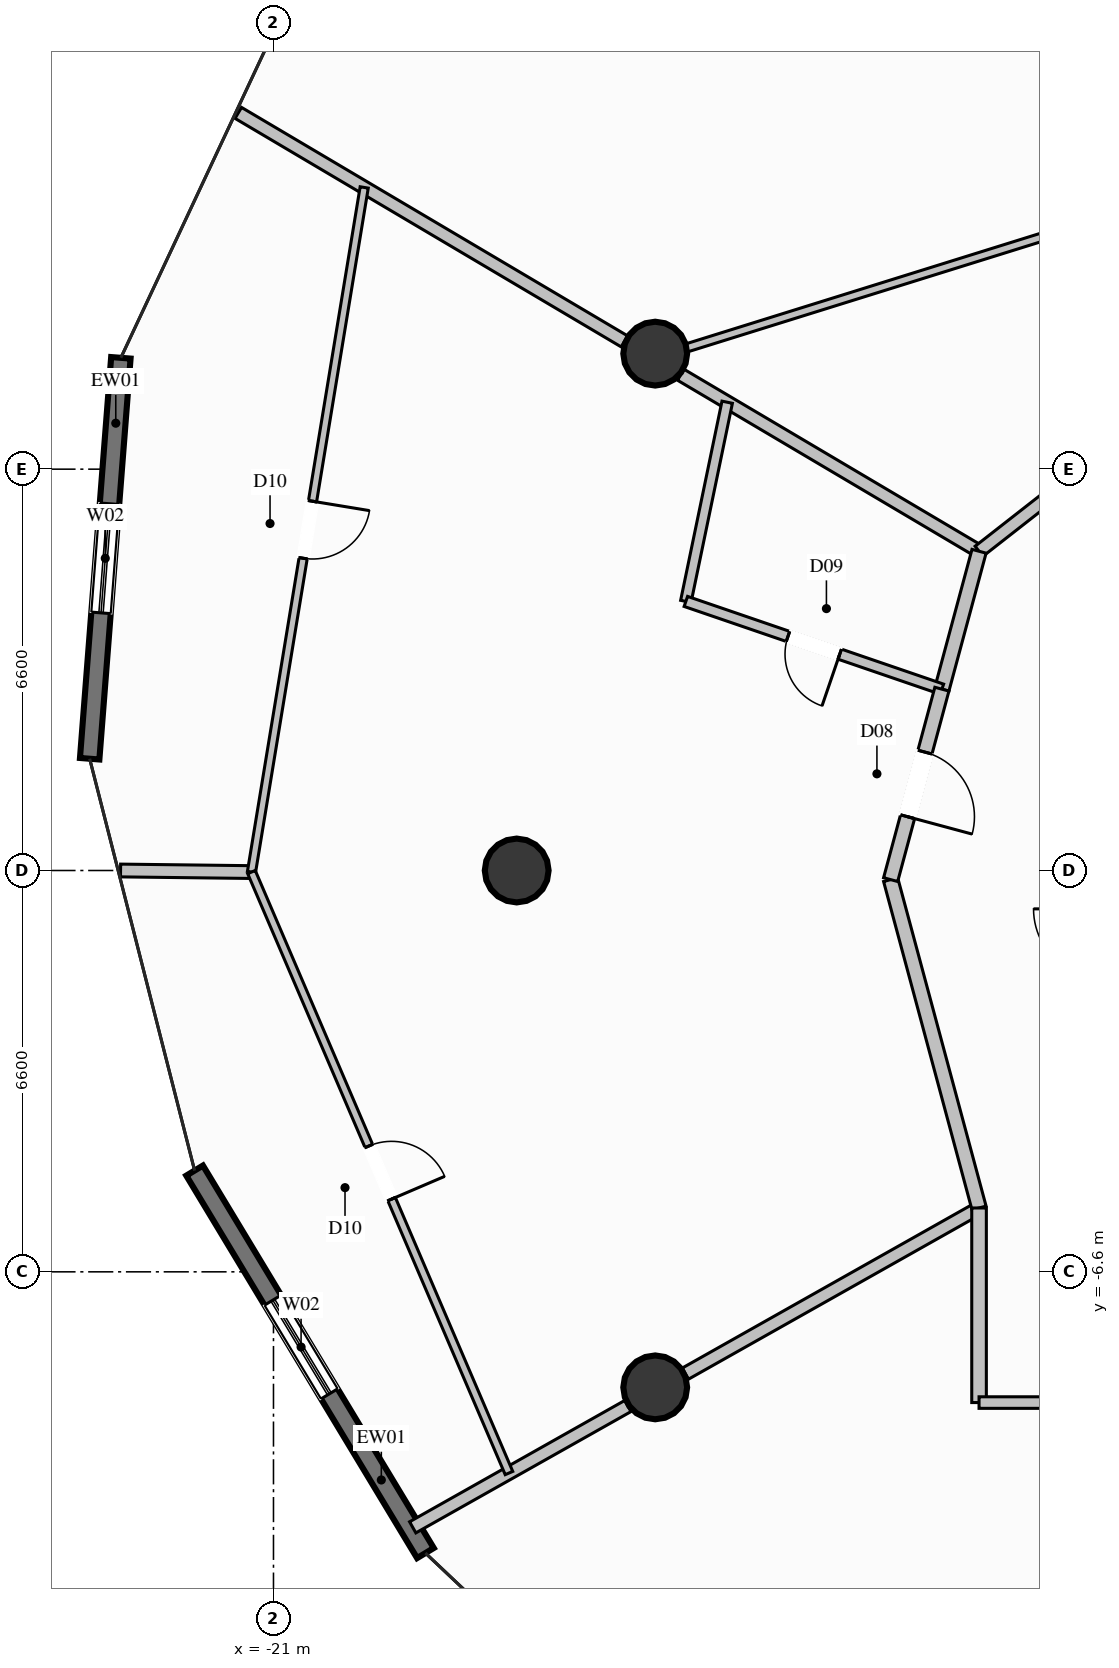
"""IFC4 building model, lengths in metres.
Left out: names, types, materials, properties, quantities, classifications, styles, units other than length and angle.
Written with IfcOpenShell. Run it as: python <this file> out.ifc"""

import sys

from ifc_helpers import new_model, si_unit, direction, frame, frame_2d, origin, origin_2d, place, context, subcontext, project, spatial, rectangle, circle, extrude, element, fill, save


model = new_model("IFC4")
c1 = context("Model", 3, precision=1e-05, world=origin(), true_north=direction((0.0, 1.0)))
c2 = subcontext(c1, "Body", "Model", "MODEL_VIEW")
j1 = project(units=[si_unit("LENGTHUNIT", "METRE"), si_unit("PLANEANGLEUNIT", "RADIAN")], contexts=[c1])
p1 = place(None, origin())
s1 = spatial("IfcSite", under=j1, at=p1, CompositionType="ELEMENT")
p2 = place(p1, origin())
s2 = spatial("IfcBuilding", under=s1, at=p2, CompositionType="ELEMENT")
p3 = place(p2, frame((0.0, 0.0, 120.6)))
s3 = spatial("IfcBuildingStorey", under=s2, at=p3, CompositionType="ELEMENT", Elevation=120.6)
for number, where, z_axis, x_axis in (
    (1, (-14.722, 8.5, 0.0), (0.0, 0.0, 1.0), (1.0, 0.0, 0.0)),
    (2, (-17.0, 0.0, 0.0), (0.0, 0.0, 1.0), (1.0, 0.0, 0.0)),
    (3, (-14.722, -8.5, 0.0), (0.0, 0.0, 1.0), (1.0, 0.0, 0.0)),
):
    element("IfcColumn", number, at=place(p3, frame(where, z_axis=z_axis, x_axis=x_axis)), inside=s3, PredefinedType="COLUMN", context=c2, shape_type="SweptSolid", body=[
        extrude(circle(Radius=0.525, at=origin_2d()), origin(), (0.0, 0.0, 1.0), 3.6),
    ])
p4 = place(p3, frame((-24.023, 1.838, 0.0), z_axis=(0.0, 0.0, 1.0), x_axis=(0.077566011703, 0.996987218488, 0.0)))
e4 = element("IfcWall", 4, at=p4, inside=s3, PredefinedType="SOLIDWALL", context=c2, shape_type="SweptSolid", body=[
    extrude(rectangle(XDim=6.613, YDim=0.32, at=frame_2d((3.307, 0.0))), origin(), (0.0, 0.0, 1.0), 3.35),
])
p5 = place(p4, frame((2.406, 0.0, 0.35)))
e5 = element("IfcOpeningElement", 5, at=p5, cuts=e4, PredefinedType="OPENING", context=c2, shape_type="SweptSolid", body=[
    extrude(rectangle(XDim=1.8, YDim=2.6, at=frame_2d((0.9, 1.3))), frame((0.0, 0.17, 0.0), z_axis=(0.0, -1.0, 0.0), x_axis=(1.0, 0.0, 0.0)), (0.0, 0.0, 1.0), 0.34),
])
p6 = place(p3, frame((-18.501, -11.225, 0.0), z_axis=(0.0, 0.0, 1.0), x_axis=(-0.516707807554, 0.856161808079, 0.0)))
e6 = element("IfcWall", 6, at=p6, inside=s3, PredefinedType="SOLIDWALL", context=c2, shape_type="SweptSolid", body=[
    extrude(rectangle(XDim=7.347, YDim=0.32, at=frame_2d((3.673, 0.0))), origin(), (0.0, 0.0, 1.0), 3.35),
])
p7 = place(p6, frame((3.058, 0.0, 0.35)))
e7 = element("IfcOpeningElement", 7, at=p7, cuts=e6, PredefinedType="OPENING", context=c2, shape_type="SweptSolid", body=[
    extrude(rectangle(XDim=1.8, YDim=2.6, at=frame_2d((0.9, 1.3))), frame((0.0, 0.17, 0.0), z_axis=(0.0, -1.0, 0.0), x_axis=(1.0, 0.0, 0.0)), (0.0, 0.0, 1.0), 0.34),
])
p8 = place(p3, frame((-9.396, 5.25, 0.0), z_axis=(0.0, 0.0, 1.0), x_axis=(-0.860613457584, 0.509258752134, 0.0)))
e8 = element("IfcWall", 8, at=p8, inside=s3, PredefinedType="PARTITIONING", context=c2, shape_type="SweptSolid", body=[
    extrude(rectangle(XDim=5.701, YDim=0.21, at=frame_2d((2.85, 0.0))), origin(), (0.0, 0.0, 1.0), 2.719),
])
p9 = place(p3, frame((-15.228, 8.701, 0.0), z_axis=(0.0, 0.0, 1.0), x_axis=(-0.860620773238, 0.509246388962, 0.0)))
e9 = element("IfcWall", 9, at=p9, inside=s3, PredefinedType="PARTITIONING", context=c2, shape_type="SweptSolid", body=[
    extrude(rectangle(XDim=7.38, YDim=0.21, at=frame_2d((3.69, 0.0))), origin(), (0.0, 0.0, 1.0), 3.35),
])
p10 = place(p3, frame((-9.396, -5.55, 0.0), z_axis=(0.0, 0.0, 1.0), x_axis=(-0.871038847926, -0.491214133962, 0.0)))
e10 = element("IfcWall", 10, at=p10, inside=s3, PredefinedType="PARTITIONING", context=c2, shape_type="SweptSolid", body=[
    extrude(rectangle(XDim=5.545, YDim=0.21, at=frame_2d((2.772, 0.0))), origin(), (0.0, 0.0, 1.0), 2.719),
])
p11 = place(p3, frame((-15.172, -8.807, 0.0), z_axis=(0.0, 0.0, 1.0), x_axis=(-0.871040458587, -0.491211277867, 0.0)))
e11 = element("IfcWall", 11, at=p11, inside=s3, PredefinedType="PARTITIONING", context=c2, shape_type="SweptSolid", body=[
    extrude(rectangle(XDim=4.062, YDim=0.21, at=frame_2d((2.031, 0.0))), origin(), (0.0, 0.0, 1.0), 3.35),
])
p12 = place(p3, frame((-9.396, 5.25, 0.0), z_axis=(0.0, 0.0, 1.0), x_axis=(0.7876993483, 0.6160598483, 0.0)))
e12 = element("IfcWall", 12, at=p12, inside=s3, PredefinedType="PARTITIONING", context=c2, shape_type="SweptSolid", body=[
    extrude(rectangle(XDim=2.597, YDim=0.21, at=frame_2d((1.299, 0.0))), origin(), (0.0, 0.0, 1.0), 3.35),
])
p13 = place(p3, frame((-14.757, 8.422, 0.0), z_axis=(0.0, 0.0, 1.0), x_axis=(0.954677897028, 0.297640912722, 0.0)))
e13 = element("IfcWall", 13, at=p13, inside=s3, PredefinedType="PARTITIONING", context=c2, shape_type="SweptSolid", body=[
    extrude(rectangle(XDim=15.458, YDim=0.135, at=frame_2d((7.729, 0.0))), origin(), (0.0, 0.0, 1.0), 2.878),
])
p14 = place(p13, frame((7.254, 0.0, 0.0)))
e14 = element("IfcOpeningElement", 14, at=p14, cuts=e13, PredefinedType="OPENING", context=c2, shape_type="SweptSolid", body=[
    extrude(rectangle(XDim=0.95, YDim=2.1, at=frame_2d((0.475, 1.05))), frame((0.0, 0.078, 0.0), z_axis=(0.0, -1.0, 0.0), x_axis=(1.0, 0.0, 0.0)), (0.0, 0.0, 1.0), 0.155),
])
p15 = place(p3, frame((-9.396, 5.25, 0.0), z_axis=(0.0, 0.0, 1.0), x_axis=(-0.260152382661, -0.965567572879, 0.0)))
e15 = element("IfcWall", 15, at=p15, inside=s3, PredefinedType="PARTITIONING", context=c2, shape_type="SweptSolid", body=[
    extrude(rectangle(XDim=2.349, YDim=0.24, at=frame_2d((1.174, 0.0))), origin(), (0.0, 0.0, 1.0), 3.35),
])
p16 = place(p3, frame((-13.538, 7.701, 0.0), z_axis=(0.0, 0.0, 1.0), x_axis=(-0.203225696563, -0.979131919741, 0.0)))
e16 = element("IfcWall", 16, at=p16, inside=s3, PredefinedType="PLUMBINGWALL", context=c2, shape_type="SweptSolid", body=[
    extrude(rectangle(XDim=3.346, YDim=0.175, at=frame_2d((1.673, 0.0))), origin(), (0.0, 0.0, 1.0), 3.35),
])
p17 = place(p3, frame((-10.007, 2.982, 0.0), z_axis=(0.0, 0.0, 1.0), x_axis=(-0.945989686211, 0.3241967205, 0.0)))
e17 = element("IfcWall", 17, at=p17, inside=s3, PredefinedType="PLUMBINGWALL", context=c2, shape_type="SweptSolid", body=[
    extrude(rectangle(XDim=4.451, YDim=0.175, at=frame_2d((2.226, 0.0))), origin(), (0.0, 0.0, 1.0), 3.35),
])
p18 = place(p17, frame((1.776, 0.0, 0.0)))
e18 = element("IfcOpeningElement", 18, at=p18, cuts=e17, PredefinedType="OPENING", context=c2, shape_type="SweptSolid", body=[
    extrude(rectangle(XDim=0.9, YDim=2.1, at=frame_2d((0.45, 1.05))), frame((0.0, 0.098, 0.0), z_axis=(0.0, -1.0, 0.0), x_axis=(1.0, 0.0, 0.0)), (0.0, 0.0, 1.0), 0.195),
])
p19 = place(p3, frame((-21.362, -0.026, 0.0), z_axis=(0.0, 0.0, 1.0), x_axis=(-0.999927757215, 0.012019997989, 0.0)))
e19 = element("IfcWall", 19, at=p19, inside=s3, PredefinedType="PARTITIONING", context=c2, shape_type="SweptSolid", body=[
    extrude(rectangle(XDim=2.153, YDim=0.21, at=frame_2d((1.077, 0.0))), origin(), (0.0, 0.0, 1.0), 3.35),
])
p20 = place(p3, frame((-10.85, -0.15, 0.0), z_axis=(0.0, 0.0, 1.0), x_axis=(0.260009481157, -0.965606063417, 0.0)))
e20 = element("IfcWall", 20, at=p20, inside=s3, PredefinedType="PARTITIONING", context=c2, shape_type="SweptSolid", body=[
    extrude(rectangle(XDim=5.593, YDim=0.24, at=frame_2d((2.796, 0.0))), origin(), (0.0, 0.0, 1.0), 3.35),
])
p21 = place(p3, frame((-10.007, 2.982, 0.0), z_axis=(0.0, 0.0, 1.0), x_axis=(-0.259924881751, -0.965628839589, 0.0)))
e21 = element("IfcWall", 21, at=p21, inside=s3, PredefinedType="PARTITIONING", context=c2, shape_type="SweptSolid", body=[
    extrude(rectangle(XDim=3.243, YDim=0.24, at=frame_2d((1.622, 0.0))), origin(), (0.0, 0.0, 1.0), 3.35),
])
p22 = place(p21, frame((1.072, 0.0, 0.0)))
e22 = element("IfcOpeningElement", 22, at=p22, cuts=e21, PredefinedType="OPENING", context=c2, shape_type="SweptSolid", body=[
    extrude(rectangle(XDim=1.1, YDim=2.3, at=frame_2d((0.55, 1.15))), frame((0.0, 0.13, 0.0), z_axis=(0.0, -1.0, 0.0), x_axis=(1.0, 0.0, 0.0)), (0.0, 0.0, 1.0), 0.26),
])
p23 = place(p3, frame((-19.508, 11.233, 0.0), z_axis=(0.0, 0.0, 1.0), x_axis=(-0.16248342038, -0.986711273931, 0.0)))
e23 = element("IfcWall", 23, at=p23, inside=s3, PredefinedType="PARTITIONING", context=c2, shape_type="SweptSolid", body=[
    extrude(rectangle(XDim=11.41, YDim=0.135, at=frame_2d((5.705, 0.0))), origin(), (0.0, 0.0, 1.0), 3.35),
])
p24 = place(p23, frame((5.23, 0.0, 0.0)))
e24 = element("IfcOpeningElement", 24, at=p24, cuts=e23, PredefinedType="OPENING", context=c2, shape_type="SweptSolid", body=[
    extrude(rectangle(XDim=0.95, YDim=2.1, at=frame_2d((0.475, 1.05))), frame((0.0, 0.078, 0.0), z_axis=(0.0, -1.0, 0.0), x_axis=(1.0, 0.0, 0.0)), (0.0, 0.0, 1.0), 0.155),
])
p25 = place(p3, frame((-21.362, -0.026, 0.0), z_axis=(0.0, 0.0, 1.0), x_axis=(0.39388093293, -0.919161471491, 0.0)))
e25 = element("IfcWall", 25, at=p25, inside=s3, PredefinedType="PARTITIONING", context=c2, shape_type="SweptSolid", body=[
    extrude(rectangle(XDim=10.752, YDim=0.135, at=frame_2d((5.376, 0.0))), origin(), (0.0, 0.0, 1.0), 3.35),
])
p26 = place(p25, frame((4.901, 0.0, 0.0)))
e26 = element("IfcOpeningElement", 26, at=p26, cuts=e25, PredefinedType="OPENING", context=c2, shape_type="SweptSolid", body=[
    extrude(rectangle(XDim=0.95, YDim=2.1, at=frame_2d((0.475, 1.05))), frame((0.0, 0.078, 0.0), z_axis=(0.0, -1.0, 0.0), x_axis=(1.0, 0.0, 0.0)), (0.0, 0.0, 1.0), 0.155),
])
p27 = place(p3, frame((-9.396, -5.55, 0.0), z_axis=(0.0, 0.0, 1.0), x_axis=(0.0, -1.0, 0.0)))
e27 = element("IfcWall", 27, at=p27, inside=s3, PredefinedType="PARTITIONING", context=c2, shape_type="SweptSolid", body=[
    extrude(rectangle(XDim=3.2, YDim=0.24, at=frame_2d((1.6, 0.0))), origin(), (0.0, 0.0, 1.0), 3.35),
])
p28 = place(p3, frame((-9.396, -8.75, 0.0), z_axis=(0.0, 0.0, 1.0), x_axis=(1.0, 0.0, 0.0)))
e28 = element("IfcWall", 28, at=p28, inside=s3, PredefinedType="PARTITIONING", context=c2, shape_type="SweptSolid", body=[
    extrude(rectangle(XDim=4.228, YDim=0.19, at=frame_2d((2.114, 0.0))), origin(), (0.0, 0.0, 1.0), 3.35),
])
p29 = place(p28, frame((1.639, 0.0, 0.0)))
e29 = element("IfcOpeningElement", 29, at=p29, cuts=e28, PredefinedType="OPENING", context=c2, shape_type="SweptSolid", body=[
    extrude(rectangle(XDim=0.95, YDim=2.1, at=frame_2d((0.475, 1.05))), frame((0.0, 0.105, 0.0), z_axis=(0.0, -1.0, 0.0), x_axis=(1.0, 0.0, 0.0)), (0.0, 0.0, 1.0), 0.21),
])
p30 = place(p5, origin())
e30 = element("IfcWindow", 30, at=p30, inside=s3, PartitioningType="SINGLE_PANEL", PredefinedType="WINDOW", context=c2, shape_type="SweptSolid", body=[
    extrude(rectangle(XDim=1.8, YDim=2.6, at=frame_2d((0.9, 1.3))), frame((0.0, 0.03, 0.0), z_axis=(0.0, -1.0, 0.0), x_axis=(1.0, 0.0, 0.0)), (0.0, 0.0, 1.0), 0.06),
])
fill(e5, e30)
p31 = place(p7, origin())
e31 = element("IfcWindow", 31, at=p31, inside=s3, PartitioningType="SINGLE_PANEL", PredefinedType="WINDOW", context=c2, shape_type="SweptSolid", body=[
    extrude(rectangle(XDim=1.8, YDim=2.6, at=frame_2d((0.9, 1.3))), frame((0.0, 0.03, 0.0), z_axis=(0.0, -1.0, 0.0), x_axis=(1.0, 0.0, 0.0)), (0.0, 0.0, 1.0), 0.06),
])
fill(e7, e31)
p32 = place(p18, origin())
e32 = element("IfcDoor", 32, at=p32, inside=s3, OperationType="SINGLE_SWING_LEFT", PredefinedType="DOOR", context=c2, shape_type="SweptSolid", body=[
    extrude(rectangle(XDim=0.9, YDim=2.1, at=frame_2d((0.45, 1.05))), frame((0.0, 0.025, 0.0), z_axis=(0.0, -1.0, 0.0), x_axis=(1.0, 0.0, 0.0)), (0.0, 0.0, 1.0), 0.05),
])
fill(e18, e32)
p33 = place(p22, origin())
e33 = element("IfcDoor", 33, at=p33, inside=s3, OperationType="SINGLE_SWING_RIGHT", PredefinedType="DOOR", context=c2, shape_type="SweptSolid", body=[
    extrude(rectangle(XDim=1.1, YDim=2.3, at=frame_2d((0.55, 1.15))), frame((0.0, 0.025, 0.0), z_axis=(0.0, -1.0, 0.0), x_axis=(1.0, 0.0, 0.0)), (0.0, 0.0, 1.0), 0.05),
])
fill(e22, e33)
p34 = place(p24, origin())
e34 = element("IfcDoor", 34, at=p34, inside=s3, OperationType="SINGLE_SWING_LEFT", PredefinedType="DOOR", context=c2, shape_type="SweptSolid", body=[
    extrude(rectangle(XDim=0.95, YDim=2.1, at=frame_2d((0.475, 1.05))), frame((0.0, 0.025, 0.0), z_axis=(0.0, -1.0, 0.0), x_axis=(1.0, 0.0, 0.0)), (0.0, 0.0, 1.0), 0.05),
])
fill(e24, e34)
p35 = place(p26, origin())
e35 = element("IfcDoor", 35, at=p35, inside=s3, OperationType="SINGLE_SWING_RIGHT", PredefinedType="DOOR", context=c2, shape_type="SweptSolid", body=[
    extrude(rectangle(XDim=0.95, YDim=2.1, at=frame_2d((0.475, 1.05))), frame((0.0, 0.025, 0.0), z_axis=(0.0, -1.0, 0.0), x_axis=(1.0, 0.0, 0.0)), (0.0, 0.0, 1.0), 0.05),
])
fill(e26, e35)
save(model, sys.argv[1])
